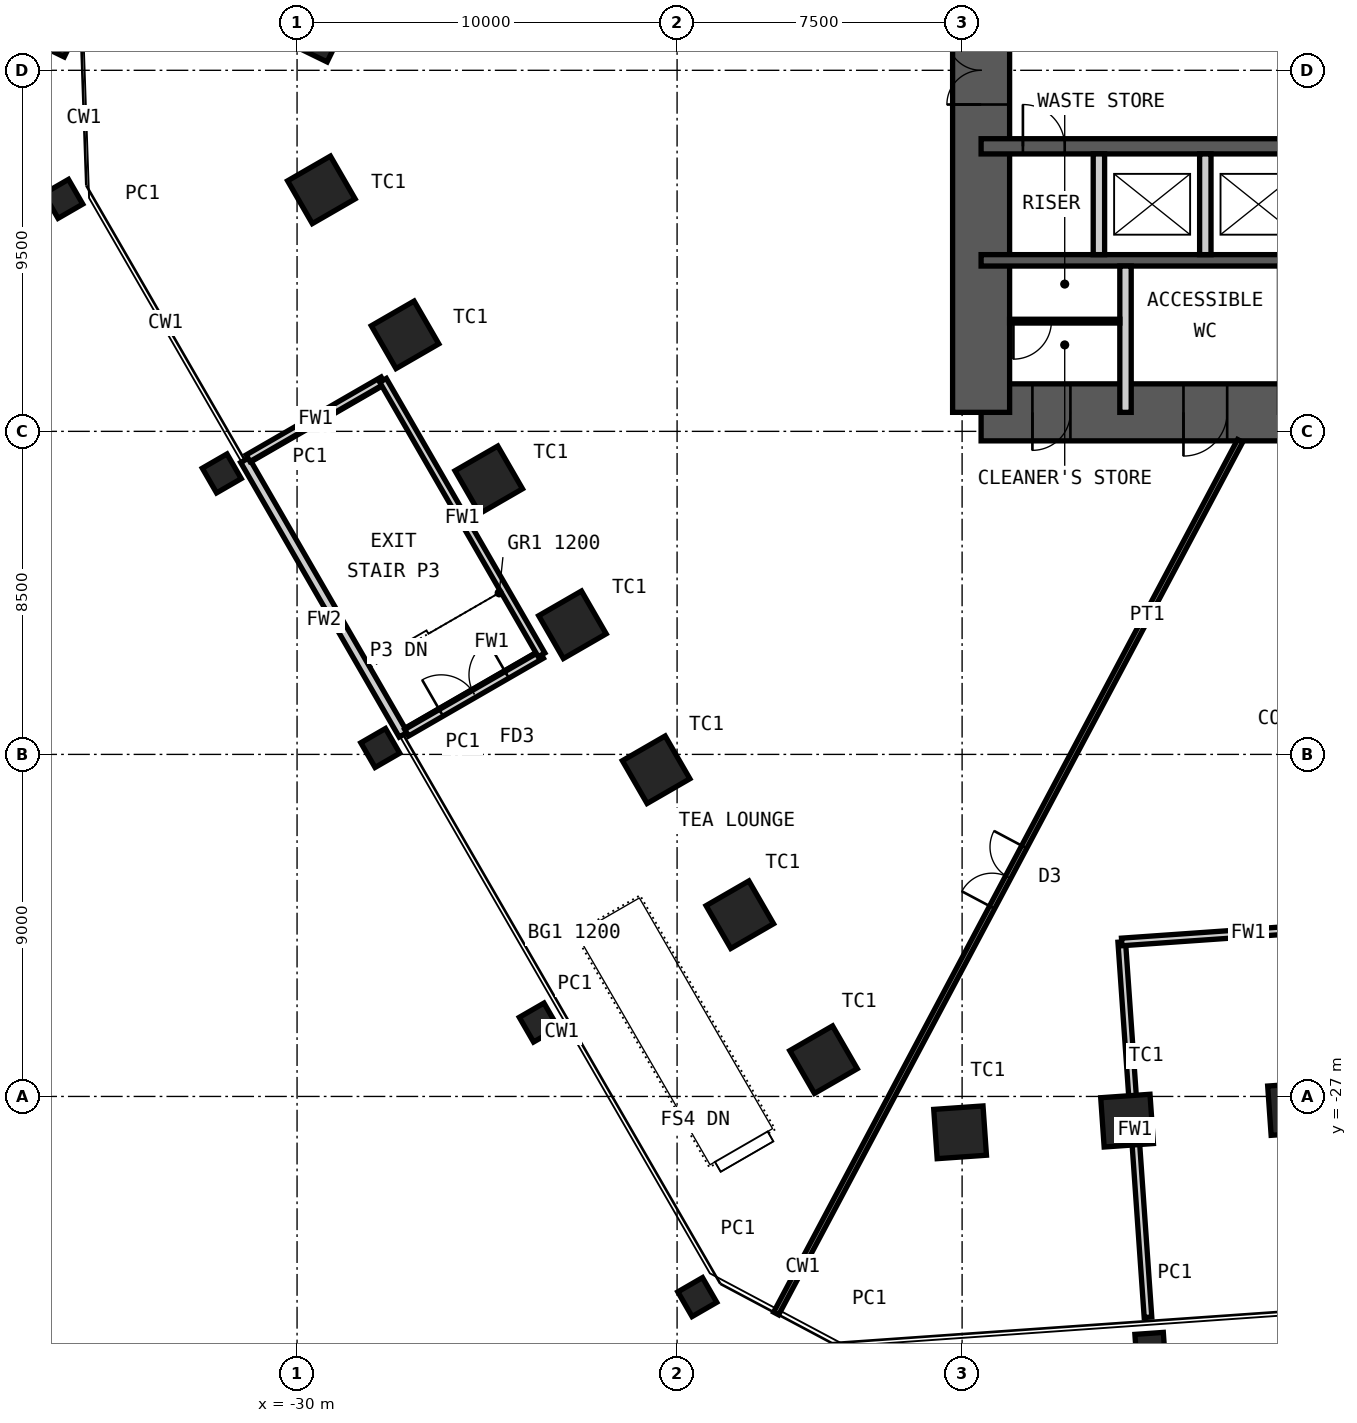
"""IFC4 building model, lengths in metres.
Left out: names, types, materials, properties, quantities, classifications, styles, units other than length and angle.
Written with IfcOpenShell. Run it as: python <this file> out.ifc"""

import sys

from ifc_helpers import new_model, si_unit, direction, frame, frame_2d, origin, origin_2d, place, context, subcontext, project, spatial, rectangle, hollow_rectangle, extrude, element, fill, save


model = new_model("IFC4")
c1 = context("Model", 3, precision=1e-05, world=origin(), true_north=direction((0.0, 1.0)))
c2 = subcontext(c1, "Body", "Model", "MODEL_VIEW")
j1 = project(units=[si_unit("LENGTHUNIT", "METRE"), si_unit("PLANEANGLEUNIT", "RADIAN")], contexts=[c1])
p1 = place(None, origin())
s1 = spatial("IfcSite", under=j1, at=p1, CompositionType="ELEMENT")
p2 = place(p1, origin())
s2 = spatial("IfcBuilding", under=s1, at=p2, CompositionType="ELEMENT")
p3 = place(p2, frame((0.0, 0.0, 12.0)))
s3 = spatial("IfcBuildingStorey", under=s2, at=p3, CompositionType="ELEMENT", Elevation=12.0)
for number, where, z_axis, x_axis in (
    (1, (-3.765, -27.329, 0.0), (0.0, 0.0, 1.0), (0.998, 0.07, 0.0)),
    (2, (-8.159, -27.636, 0.0), (0.0, 0.0, 1.0), (0.998, 0.07, 0.0)),
    (3, (-12.553, -27.944, 0.0), (0.0, 0.0, 1.0), (0.998, 0.07, 0.0)),
    (4, (-16.147, -26.033, 0.0), (0.0, 0.0, 1.0), (0.5, -0.866, 0.0)),
    (5, (-18.349, -22.218, 0.0), (0.0, 0.0, 1.0), (0.5, -0.866, 0.0)),
    (6, (-20.552, -18.404, 0.0), (0.0, 0.0, 1.0), (0.5, -0.866, 0.0)),
    (7, (-22.754, -14.589, 0.0), (0.0, 0.0, 1.0), (0.5, -0.866, 0.0)),
    (8, (-24.956, -10.775, 0.0), (0.0, 0.0, 1.0), (0.5, -0.866, 0.0)),
    (9, (-27.158, -6.96, 0.0), (0.0, 0.0, 1.0), (0.5, -0.866, 0.0)),
    (10, (-29.361, -3.146, 0.0), (0.0, 0.0, 1.0), (0.5, -0.866, 0.0)),
    (11, (-29.509, 1.09, 0.0), (0.0, 0.0, 1.0), (-0.438, -0.899, 0.0)),
):
    element("IfcColumn", number, at=place(p3, frame(where, z_axis=z_axis, x_axis=x_axis)), inside=s3, PredefinedType="COLUMN", context=c2, shape_type="SweptSolid", body=[
        extrude(hollow_rectangle(XDim=1.3, YDim=1.3, WallThickness=0.1, at=origin_2d()), origin(), (0.0, 0.0, 1.0), 5.0),
    ])
for number, where, z_axis, x_axis in (
    (12, (-7.553, -33.609, 0.0), (0.0, 0.0, 1.0), (0.998, 0.07, 0.0)),
    (13, (-19.469, -32.28, 0.0), (0.0, 0.0, 1.0), (0.5, -0.866, 0.0)),
    (14, (-23.639, -25.055, 0.0), (0.0, 0.0, 1.0), (0.5, -0.866, 0.0)),
    (15, (-27.81, -17.831, 0.0), (0.0, 0.0, 1.0), (0.5, -0.866, 0.0)),
    (16, (-31.981, -10.607, 0.0), (0.0, 0.0, 1.0), (0.5, -0.866, 0.0)),
    (17, (-36.3, 0.853, 0.0), (0.0, 0.0, 1.0), (-0.438, -0.899, 0.0)),
    (18, (-36.152, -3.383, 0.0), (0.0, 0.0, 1.0), (0.5, -0.866, 0.0)),
):
    element("IfcColumn", number, at=place(p3, frame(where, z_axis=z_axis, x_axis=x_axis)), inside=s3, PredefinedType="COLUMN", context=c2, shape_type="SweptSolid", body=[
        extrude(hollow_rectangle(XDim=0.75, YDim=0.75, WallThickness=0.036, at=origin_2d()), origin(), (0.0, 0.0, 1.0), 5.0),
    ])
p4 = place(p3, frame((-12.0, -9.0, 0.0), z_axis=(0.0, 0.0, 1.0), x_axis=(1.0, 0.0, 0.0)))
e19 = element("IfcWall", 19, at=p4, inside=s3, PredefinedType="SHEAR", context=c2, shape_type="SweptSolid", body=[
    extrude(rectangle(XDim=24.0, YDim=1.5, at=frame_2d((12.0, 0.0))), origin(), (0.0, 0.0, 1.0), 5.0),
])
p5 = place(p4, frame((1.35, 0.0, 0.0)))
e20 = element("IfcOpeningElement", 20, at=p5, cuts=e19, PredefinedType="OPENING", context=c2, shape_type="SweptSolid", body=[
    extrude(rectangle(XDim=1.0, YDim=2.1, at=frame_2d((0.5, 1.05))), frame((0.0, 0.76, 0.0), z_axis=(0.0, -1.0, 0.0), x_axis=(1.0, 0.0, 0.0)), (0.0, 0.0, 1.0), 1.52),
])
p6 = place(p4, frame((5.325, 0.0, 0.0)))
e21 = element("IfcOpeningElement", 21, at=p6, cuts=e19, PredefinedType="OPENING", context=c2, shape_type="SweptSolid", body=[
    extrude(rectangle(XDim=1.15, YDim=2.1, at=frame_2d((0.575, 1.05))), frame((0.0, 0.76, 0.0), z_axis=(0.0, -1.0, 0.0), x_axis=(1.0, 0.0, 0.0)), (0.0, 0.0, 1.0), 1.52),
])
p7 = place(p4, frame((12.6, 0.0, 0.0)))
e22 = element("IfcOpeningElement", 22, at=p7, cuts=e19, PredefinedType="OPENING", context=c2, shape_type="SweptSolid", body=[
    extrude(rectangle(XDim=1.0, YDim=2.1, at=frame_2d((0.5, 1.05))), frame((0.0, 0.76, 0.0), z_axis=(0.0, -1.0, 0.0), x_axis=(1.0, 0.0, 0.0)), (0.0, 0.0, 1.0), 1.52),
])
p8 = place(p3, frame((-12.0, -9.0, 0.0), z_axis=(0.0, 0.0, 1.0), x_axis=(0.0, 1.0, 0.0)))
e23 = element("IfcWall", 23, at=p8, inside=s3, PredefinedType="SHEAR", context=c2, shape_type="SweptSolid", body=[
    extrude(rectangle(XDim=18.0, YDim=1.5, at=frame_2d((9.0, 0.0))), origin(), (0.0, 0.0, 1.0), 5.0),
])
p9 = place(p8, frame((8.1, 0.0, 0.0)))
e24 = element("IfcOpeningElement", 24, at=p9, cuts=e23, PredefinedType="OPENING", context=c2, shape_type="SweptSolid", body=[
    extrude(rectangle(XDim=1.8, YDim=2.1, at=frame_2d((0.9, 1.05))), frame((0.0, 0.76, 0.0), z_axis=(0.0, -1.0, 0.0), x_axis=(1.0, 0.0, 0.0)), (0.0, 0.0, 1.0), 1.52),
])
p10 = place(p3, frame((-12.0, -2.0, 0.0), z_axis=(0.0, 0.0, 1.0), x_axis=(1.0, 0.0, 0.0)))
e25 = element("IfcWall", 25, at=p10, inside=s3, PredefinedType="SHEAR", context=c2, shape_type="SweptSolid", body=[
    extrude(rectangle(XDim=24.0, YDim=0.4, at=frame_2d((12.0, 0.0))), origin(), (0.0, 0.0, 1.0), 5.0),
])
p11 = place(p10, frame((1.1, 0.0, 0.0)))
e26 = element("IfcOpeningElement", 26, at=p11, cuts=e25, PredefinedType="OPENING", context=c2, shape_type="SweptSolid", body=[
    extrude(rectangle(XDim=1.1, YDim=2.1, at=frame_2d((0.55, 1.05))), frame((0.0, 0.21, 0.0), z_axis=(0.0, -1.0, 0.0), x_axis=(1.0, 0.0, 0.0)), (0.0, 0.0, 1.0), 0.42),
])
p12 = place(p10, frame((13.55, 0.0, 0.0)))
e27 = element("IfcOpeningElement", 27, at=p12, cuts=e25, PredefinedType="OPENING", context=c2, shape_type="SweptSolid", body=[
    extrude(rectangle(XDim=1.1, YDim=2.1, at=frame_2d((0.55, 1.05))), frame((0.0, 0.21, 0.0), z_axis=(0.0, -1.0, 0.0), x_axis=(1.0, 0.0, 0.0)), (0.0, 0.0, 1.0), 0.42),
])
p13 = place(p10, frame((20.7, 0.0, 0.0)))
e28 = element("IfcOpeningElement", 28, at=p13, cuts=e25, PredefinedType="OPENING", context=c2, shape_type="SweptSolid", body=[
    extrude(rectangle(XDim=1.1, YDim=2.1, at=frame_2d((0.55, 1.05))), frame((0.0, 0.21, 0.0), z_axis=(0.0, -1.0, 0.0), x_axis=(1.0, 0.0, 0.0)), (0.0, 0.0, 1.0), 0.42),
])
p14 = place(p3, frame((-12.0, -5.0, 0.0), z_axis=(0.0, 0.0, 1.0), x_axis=(1.0, 0.0, 0.0)))
e29 = element("IfcWall", 29, at=p14, inside=s3, PredefinedType="SHEAR", context=c2, shape_type="SweptSolid", body=[
    extrude(rectangle(XDim=24.0, YDim=0.3, at=frame_2d((12.0, 0.0))), origin(), (0.0, 0.0, 1.0), 5.0),
])
for number, where, z_axis, x_axis in (
    (30, (-8.9, -4.85, 0.0), (0.0, 0.0, 1.0), (0.0, 1.0, 0.0)),
    (31, (-6.1, -4.85, 0.0), (0.0, 0.0, 1.0), (0.0, 1.0, 0.0)),
):
    element("IfcWall", number, at=place(p3, frame(where, z_axis=z_axis, x_axis=x_axis)), inside=s3, PredefinedType="PARTITIONING", context=c2, shape_type="SweptSolid", body=[
        extrude(rectangle(XDim=2.65, YDim=0.3, at=frame_2d((1.325, 0.0))), origin(), (0.0, 0.0, 1.0), 4.78),
    ])
p15 = place(p3, frame((-8.2, -9.0, 0.0), z_axis=(0.0, 0.0, 1.0), x_axis=(0.0, 1.0, 0.0)))
e32 = element("IfcWall", 32, at=p15, inside=s3, PredefinedType="PARTITIONING", context=c2, shape_type="SweptSolid", body=[
    extrude(rectangle(XDim=3.85, YDim=0.3, at=frame_2d((1.925, 0.0))), origin(), (0.0, 0.0, 1.0), 4.78),
])
p16 = place(p3, frame((-27.204, -17.481, 0.0), z_axis=(0.0, 0.0, 1.0), x_axis=(-0.500004511595, 0.866022798998, 0.0)))
e33 = element("IfcWall", 33, at=p16, inside=s3, PredefinedType="SOLIDWALL", context=c2, shape_type="SweptSolid", body=[
    extrude(rectangle(XDim=8.342, YDim=0.25, at=frame_2d((4.171, 0.0))), origin(), (0.0, 0.0, 1.0), 4.7),
])
p17 = place(p3, frame((-11.25, -6.6, 0.0), z_axis=(0.0, 0.0, 1.0), x_axis=(1.0, 0.0, 0.0)))
e34 = element("IfcWall", 34, at=p17, inside=s3, PredefinedType="PARTITIONING", context=c2, shape_type="SweptSolid", body=[
    extrude(rectangle(XDim=2.9, YDim=0.1, at=frame_2d((1.45, 0.0))), origin(), (0.0, 0.0, 1.0), 4.78),
])
p18 = place(p17, frame((0.1, 0.0, 0.0)))
e35 = element("IfcOpeningElement", 35, at=p18, cuts=e34, PredefinedType="OPENING", context=c2, shape_type="SweptSolid", body=[
    extrude(rectangle(XDim=1.0, YDim=2.4, at=frame_2d((0.5, 1.2))), frame((0.0, 0.06, 0.0), z_axis=(0.0, -1.0, 0.0), x_axis=(1.0, 0.0, 0.0)), (0.0, 0.0, 1.0), 0.12),
])
p19 = place(p3, frame((-7.609, -32.811, 0.0), z_axis=(0.0, 0.0, 1.0), x_axis=(-0.069764341483, 0.997563500063, 0.0)))
e36 = element("IfcWall", 36, at=p19, inside=s3, PredefinedType="PARTITIONING", context=c2, shape_type="SweptSolid", body=[
    extrude(rectangle(XDim=9.9, YDim=0.2, at=frame_2d((4.95, 0.0))), origin(), (0.0, 0.0, 1.0), 4.7),
])
p20 = place(p3, frame((8.344, -21.771, 0.0), z_axis=(0.0, 0.0, 1.0), x_axis=(-0.997563959397, -0.069757773133, 0.0)))
e37 = element("IfcWall", 37, at=p20, inside=s3, PredefinedType="PARTITIONING", context=c2, shape_type="SweptSolid", body=[
    extrude(rectangle(XDim=16.684, YDim=0.2, at=frame_2d((8.342, 0.0))), origin(), (0.0, 0.0, 1.0), 4.7),
])
p21 = place(p20, frame((7.342, 0.0, 0.0)))
e38 = element("IfcOpeningElement", 38, at=p21, cuts=e37, PredefinedType="OPENING", context=c2, shape_type="SweptSolid", body=[
    extrude(rectangle(XDim=2.0, YDim=2.4, at=frame_2d((1.0, 1.2))), frame((0.0, 0.11, 0.0), z_axis=(0.0, -1.0, 0.0), x_axis=(1.0, 0.0, 0.0)), (0.0, 0.0, 1.0), 0.22),
])
p22 = place(p3, frame((-5.184, -9.75, 0.0), z_axis=(0.0, 0.0, 1.0), x_axis=(-0.469477354847, -0.882944513141, 0.0)))
e39 = element("IfcWall", 39, at=p22, inside=s3, PredefinedType="PARTITIONING", context=c2, shape_type="SweptSolid", body=[
    extrude(rectangle(XDim=26.005, YDim=0.15, at=frame_2d((13.002, 0.0))), origin(), (0.0, 0.0, 1.0), 4.7),
])
p23 = place(p22, frame((12.103, 0.0, 0.0)))
e40 = element("IfcOpeningElement", 40, at=p23, cuts=e39, PredefinedType="OPENING", context=c2, shape_type="SweptSolid", body=[
    extrude(rectangle(XDim=1.8, YDim=2.4, at=frame_2d((0.9, 1.2))), frame((0.0, 0.085, 0.0), z_axis=(0.0, -1.0, 0.0), x_axis=(1.0, 0.0, 0.0)), (0.0, 0.0, 1.0), 0.17),
])
p24 = place(p3, frame((-27.117, -17.431, 0.0), z_axis=(0.0, 0.0, 1.0), x_axis=(0.8660249478, 0.500000789788, 0.0)))
e41 = element("IfcWall", 41, at=p24, inside=s3, PredefinedType="PARTITIONING", context=c2, shape_type="SweptSolid", body=[
    extrude(rectangle(XDim=4.1, YDim=0.2, at=frame_2d((2.05, 0.0))), origin(), (0.0, 0.0, 1.0), 4.7),
])
p25 = place(p24, frame((1.05, 0.0, 0.0)))
e42 = element("IfcOpeningElement", 42, at=p25, cuts=e41, PredefinedType="OPENING", context=c2, shape_type="SweptSolid", body=[
    extrude(rectangle(XDim=2.0, YDim=2.4, at=frame_2d((1.0, 1.2))), frame((0.0, 0.11, 0.0), z_axis=(0.0, -1.0, 0.0), x_axis=(1.0, 0.0, 0.0)), (0.0, 0.0, 1.0), 0.22),
])
p26 = place(p3, frame((-31.288, -10.207, 0.0), z_axis=(0.0, 0.0, 1.0), x_axis=(0.8660249478, 0.500000789788, 0.0)))
e43 = element("IfcWall", 43, at=p26, inside=s3, PredefinedType="PARTITIONING", context=c2, shape_type="SweptSolid", body=[
    extrude(rectangle(XDim=4.1, YDim=0.2, at=frame_2d((2.05, 0.0))), origin(), (0.0, 0.0, 1.0), 4.7),
])
p27 = place(p3, frame((-23.567, -15.381, 0.0), z_axis=(0.0, 0.0, 1.0), x_axis=(-0.500004511595, 0.866022798998, 0.0)))
e44 = element("IfcWall", 44, at=p27, inside=s3, PredefinedType="PARTITIONING", context=c2, shape_type="SweptSolid", body=[
    extrude(rectangle(XDim=8.342, YDim=0.2, at=frame_2d((4.171, 0.0))), origin(), (0.0, 0.0, 1.0), 4.7),
])
p28 = place(p5, origin())
e45 = element("IfcDoor", 45, at=p28, inside=s3, OperationType="SINGLE_SWING_LEFT", PredefinedType="DOOR", context=c2, shape_type="SweptSolid", body=[
    extrude(rectangle(XDim=1.0, YDim=2.1, at=frame_2d((0.5, 1.05))), frame((0.0, 0.025, 0.0), z_axis=(0.0, -1.0, 0.0), x_axis=(1.0, 0.0, 0.0)), (0.0, 0.0, 1.0), 0.05),
])
fill(e20, e45)
p29 = place(p6, origin())
e46 = element("IfcDoor", 46, at=p29, inside=s3, OperationType="SINGLE_SWING_LEFT", PredefinedType="DOOR", context=c2, shape_type="SweptSolid", body=[
    extrude(rectangle(XDim=1.15, YDim=2.1, at=frame_2d((0.575, 1.05))), frame((0.0, 0.025, 0.0), z_axis=(0.0, -1.0, 0.0), x_axis=(1.0, 0.0, 0.0)), (0.0, 0.0, 1.0), 0.05),
])
fill(e21, e46)
p30 = place(p11, origin())
e47 = element("IfcDoor", 47, at=p30, inside=s3, OperationType="SINGLE_SWING_RIGHT", PredefinedType="DOOR", context=c2, shape_type="SweptSolid", body=[
    extrude(rectangle(XDim=1.1, YDim=2.1, at=frame_2d((0.55, 1.05))), frame((0.0, 0.025, 0.0), z_axis=(0.0, -1.0, 0.0), x_axis=(1.0, 0.0, 0.0)), (0.0, 0.0, 1.0), 0.05),
])
fill(e26, e47)
p31 = place(p9, origin())
e48 = element("IfcDoor", 48, at=p31, inside=s3, OperationType="DOUBLE_DOOR_DOUBLE_SWING", PredefinedType="DOOR", context=c2, shape_type="SweptSolid", body=[
    extrude(rectangle(XDim=1.8, YDim=2.1, at=frame_2d((0.9, 1.05))), frame((0.0, 0.025, 0.0), z_axis=(0.0, -1.0, 0.0), x_axis=(1.0, 0.0, 0.0)), (0.0, 0.0, 1.0), 0.05),
])
fill(e24, e48)
p32 = place(p18, origin())
e49 = element("IfcDoor", 49, at=p32, inside=s3, OperationType="SINGLE_SWING_LEFT", PredefinedType="DOOR", context=c2, shape_type="SweptSolid", body=[
    extrude(rectangle(XDim=1.0, YDim=2.4, at=frame_2d((0.5, 1.2))), frame((0.0, 0.025, 0.0), z_axis=(0.0, -1.0, 0.0), x_axis=(1.0, 0.0, 0.0)), (0.0, 0.0, 1.0), 0.05),
])
fill(e35, e49)
p33 = place(p23, origin())
e50 = element("IfcDoor", 50, at=p33, inside=s3, OperationType="DOUBLE_DOOR_DOUBLE_SWING", PredefinedType="DOOR", context=c2, shape_type="SweptSolid", body=[
    extrude(rectangle(XDim=1.8, YDim=2.4, at=frame_2d((0.9, 1.2))), frame((0.0, 0.025, 0.0), z_axis=(0.0, -1.0, 0.0), x_axis=(1.0, 0.0, 0.0)), (0.0, 0.0, 1.0), 0.05),
])
fill(e40, e50)
p34 = place(p25, origin())
e51 = element("IfcDoor", 51, at=p34, inside=s3, OperationType="DOUBLE_DOOR_DOUBLE_SWING", PredefinedType="DOOR", context=c2, shape_type="SweptSolid", body=[
    extrude(rectangle(XDim=2.0, YDim=2.4, at=frame_2d((1.0, 1.2))), frame((0.0, 0.025, 0.0), z_axis=(0.0, -1.0, 0.0), x_axis=(1.0, 0.0, 0.0)), (0.0, 0.0, 1.0), 0.05),
])
fill(e42, e51)
save(model, sys.argv[1])
